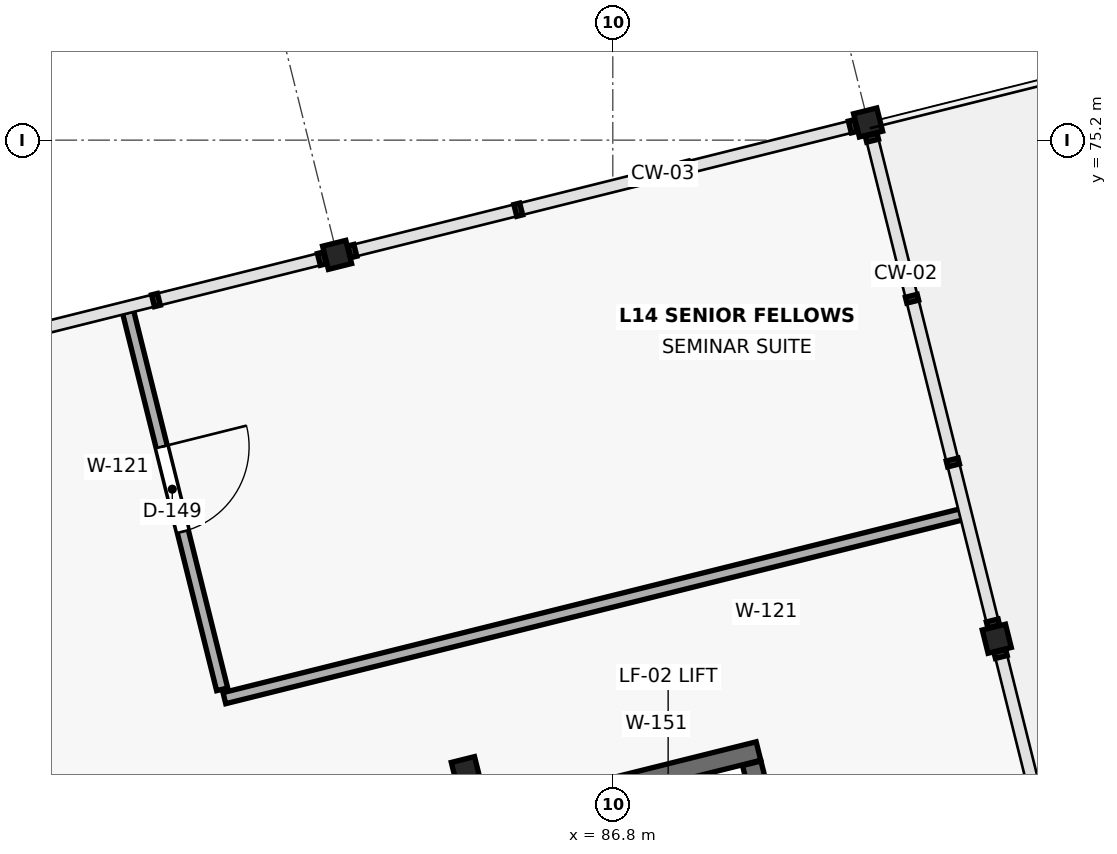
"""IFC4 building model, lengths in metres.
Left out: names, types, materials, properties, quantities, classifications, styles, units other than length and angle.
Written with IfcOpenShell. Run it as: python <this file> out.ifc"""

import sys

from ifc_helpers import new_model, si_unit, direction, frame, frame_2d, origin, origin_2d, place, context, subcontext, project, spatial, rectangle, extrude, element, fill, save


model = new_model("IFC4")
c1 = context("Model", 3, precision=1e-05, world=origin(), true_north=direction((0.0, 1.0)))
c2 = subcontext(c1, "Body", "Model", "MODEL_VIEW")
j1 = project(units=[si_unit("LENGTHUNIT", "METRE"), si_unit("PLANEANGLEUNIT", "RADIAN")], contexts=[c1])
p1 = place(None, origin())
s1 = spatial("IfcSite", under=j1, at=p1, CompositionType="ELEMENT")
p2 = place(p1, origin())
s2 = spatial("IfcBuilding", under=s1, at=p2, CompositionType="ELEMENT")
p3 = place(p2, frame((0.0, 0.0, 57.3)))
s3 = spatial("IfcBuildingStorey", under=s2, at=p3, CompositionType="ELEMENT", Elevation=57.3)
for number, where, z_axis, x_axis in (
    (1, (84.866, 66.898, 0.0), (0.0, 0.0, 1.0), (0.97, 0.242, 0.0)),
    (2, (83.173, 73.691, 0.0), (0.0, 0.0, 1.0), (0.97, 0.242, 0.0)),
    (3, (91.852, 68.64, 0.0), (0.0, 0.0, 1.0), (0.97, 0.242, 0.0)),
    (4, (90.159, 75.432, 0.0), (0.0, 0.0, 1.0), (0.97, 0.242, 0.0)),
):
    element("IfcColumn", number, at=place(p3, frame(where, z_axis=z_axis, x_axis=x_axis)), inside=s3, PredefinedType="COLUMN", context=c2, shape_type="SweptSolid", body=[
        extrude(rectangle(XDim=0.315, YDim=0.315, at=origin_2d()), origin(), (0.0, 0.0, 1.0), 3.9),
    ])
p4 = place(p3, frame((88.717, 67.163, 0.0), z_axis=(0.0, 0.0, 1.0), x_axis=(-0.970294894235, -0.241925232711, 0.0)))
e5 = element("IfcWall", 5, at=p4, inside=s3, PredefinedType="SHEAR", context=c2, shape_type="SweptSolid", body=[
    extrude(rectangle(XDim=3.2, YDim=0.25, at=frame_2d((1.6, 0.0))), origin(), (0.0, 0.0, 1.0), 3.655),
])
p5 = place(p3, frame((89.155, 64.886, 0.0), z_axis=(0.0, 0.0, 1.0), x_axis=(-0.241903146974, 0.970300400641, 0.0)))
e6 = element("IfcWall", 6, at=p5, inside=s3, PredefinedType="SHEAR", context=c2, shape_type="SweptSolid", body=[
    extrude(rectangle(XDim=2.18, YDim=0.25, at=frame_2d((1.09, 0.0))), origin(), (0.0, 0.0, 1.0), 3.655),
])
p6 = place(p3, frame((81.689, 67.858, 0.0), z_axis=(0.0, 0.0, 1.0), x_axis=(0.970291819732, 0.241937563353, 0.0)))
e7 = element("IfcWall", 7, at=p6, inside=s3, PredefinedType="PARTITIONING", context=c2, shape_type="SweptSolid", body=[
    extrude(rectangle(XDim=9.99, YDim=0.15, at=frame_2d((4.995, 0.0))), origin(), (0.0, 0.0, 1.0), 3.655),
])
p7 = place(p3, frame((80.422, 72.943, 0.0), z_axis=(0.0, 0.0, 1.0), x_axis=(0.241896058636, -0.970302167789, 0.0)))
e8 = element("IfcWall", 8, at=p7, inside=s3, PredefinedType="PARTITIONING", context=c2, shape_type="SweptSolid", body=[
    extrude(rectangle(XDim=5.12, YDim=0.15, at=frame_2d((2.56, 0.0))), origin(), (0.0, 0.0, 1.0), 3.655),
])
p8 = place(p7, frame((1.831, 0.0, 0.0)))
e9 = element("IfcOpeningElement", 9, at=p8, cuts=e8, PredefinedType="OPENING", context=c2, shape_type="SweptSolid", body=[
    extrude(rectangle(XDim=1.15, YDim=2.3, at=frame_2d((0.575, 1.15))), frame((0.0, 0.087, 0.0), z_axis=(0.0, -1.0, 0.0), x_axis=(1.0, 0.0, 0.0)), (0.0, 0.0, 1.0), 0.174),
])
p9 = place(p8, origin())
e10 = element("IfcDoor", 10, at=p9, inside=s3, OperationType="SINGLE_SWING_LEFT", PredefinedType="DOOR", context=c2, shape_type="SweptSolid", body=[
    extrude(rectangle(XDim=1.15, YDim=2.3, at=frame_2d((0.575, 1.15))), frame((0.0, 0.025, 0.0), z_axis=(0.0, -1.0, 0.0), x_axis=(1.0, 0.0, 0.0)), (0.0, 0.0, 1.0), 0.05),
])
fill(e9, e10)
save(model, sys.argv[1])
